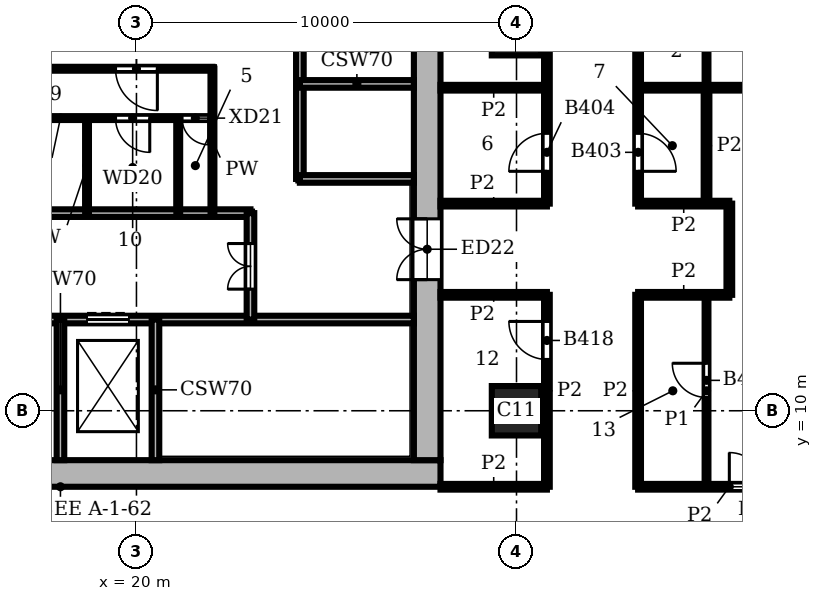
"""IFC4 building model, lengths in metres.
Left out: names, types, materials, properties, quantities, classifications, styles, units other than length and angle.
Written with IfcOpenShell. Run it as: python <this file> out.ifc"""

import sys

from ifc_helpers import new_model, si_unit, direction, frame, frame_2d, origin, origin_2d, place, context, subcontext, project, spatial, rectangle, extrude, element, fill, save


model = new_model("IFC4")
c1 = context("Model", 3, precision=1e-05, world=origin(), true_north=direction((0.0, 1.0)))
c2 = subcontext(c1, "Body", "Model", "MODEL_VIEW")
j1 = project(units=[si_unit("LENGTHUNIT", "METRE"), si_unit("PLANEANGLEUNIT", "RADIAN")], contexts=[c1])
p1 = place(None, origin())
s1 = spatial("IfcSite", under=j1, at=p1, CompositionType="ELEMENT")
p2 = place(p1, origin())
s2 = spatial("IfcBuilding", under=s1, at=p2, CompositionType="ELEMENT")
p3 = place(p2, frame((0.0, 0.0, 166.8)))
s3 = spatial("IfcBuildingStorey", under=s2, at=p3, CompositionType="ELEMENT", Elevation=166.8)
for number, where, z_axis, x_axis in (
    (1, (30.0, 10.0, 0.0), (0.0, 0.0, 1.0), (1.0, 0.0, 0.0)),
    (2, (30.0, 20.0, 0.0), (0.0, 0.0, 1.0), (1.0, 0.0, 0.0)),
):
    element("IfcColumn", number, at=place(p3, frame(where, z_axis=z_axis, x_axis=x_axis)), inside=s3, PredefinedType="COLUMN", context=c2, shape_type="SweptSolid", body=[
        extrude(rectangle(XDim=1.3, YDim=1.3, at=origin_2d()), origin(), (0.0, 0.0, 1.0), 3.9),
    ])
p4 = place(p3, frame((8.0, 8.35, 0.0), z_axis=(0.0, 0.0, 1.0), x_axis=(1.0, 0.0, 0.0)))
e3 = element("IfcWall", 3, at=p4, inside=s3, PredefinedType="SHEAR", context=c2, shape_type="SweptSolid", body=[
    extrude(rectangle(XDim=20.0, YDim=0.7, at=frame_2d((10.0, 0.0))), origin(), (0.0, 0.0, 1.0), 3.9),
])
p5 = place(p3, frame((27.65, 8.7, 0.0), z_axis=(0.0, 0.0, 1.0), x_axis=(0.0, 1.0, 0.0)))
e4 = element("IfcWall", 4, at=p5, inside=s3, PredefinedType="SHEAR", context=c2, shape_type="SweptSolid", body=[
    extrude(rectangle(XDim=18.6, YDim=0.7, at=frame_2d((9.3, 0.0))), origin(), (0.0, 0.0, 1.0), 3.9),
])
p6 = place(p5, frame((4.75, 0.0, 0.0)))
e5 = element("IfcOpeningElement", 5, at=p6, cuts=e4, PredefinedType="OPENING", context=c2, shape_type="SweptSolid", body=[
    extrude(rectangle(XDim=1.6, YDim=2.1, at=frame_2d((0.8, 1.05))), frame((0.0, 0.36, 0.0), z_axis=(0.0, -1.0, 0.0), x_axis=(1.0, 0.0, 0.0)), (0.0, 0.0, 1.0), 0.72),
])
p7 = place(p3, frame((13.8, 12.4, 0.0), z_axis=(0.0, 0.0, 1.0), x_axis=(1.0, 0.0, 0.0)))
e6 = element("IfcWall", 6, at=p7, inside=s3, PredefinedType="SHEAR", context=c2, shape_type="SweptSolid", body=[
    extrude(rectangle(XDim=13.5, YDim=0.2, at=frame_2d((6.75, 0.0))), origin(), (0.0, 0.0, 1.0), 3.58),
])
p8 = place(p7, frame((2.4, 0.0, 0.0)))
e7 = element("IfcOpeningElement", 7, at=p8, cuts=e6, PredefinedType="OPENING", context=c2, shape_type="SweptSolid", body=[
    extrude(rectangle(XDim=1.1, YDim=2.1, at=frame_2d((0.55, 1.05))), frame((0.0, 0.11, 0.0), z_axis=(0.0, -1.0, 0.0), x_axis=(1.0, 0.0, 0.0)), (0.0, 0.0, 1.0), 0.22),
])
p9 = place(p7, frame((4.9, 0.0, 0.0)))
e8 = element("IfcOpeningElement", 8, at=p9, cuts=e6, PredefinedType="OPENING", context=c2, shape_type="SweptSolid", body=[
    extrude(rectangle(XDim=1.1, YDim=2.1, at=frame_2d((0.55, 1.05))), frame((0.0, 0.11, 0.0), z_axis=(0.0, -1.0, 0.0), x_axis=(1.0, 0.0, 0.0)), (0.0, 0.0, 1.0), 0.22),
])
p10 = place(p7, frame((0.2, 0.0, 0.0)))
e9 = element("IfcOpeningElement", 9, at=p10, cuts=e6, PredefinedType="OPENING", context=c2, shape_type="SweptSolid", body=[
    extrude(rectangle(XDim=1.0, YDim=2.1, at=frame_2d((0.5, 1.05))), frame((0.0, 0.11, 0.0), z_axis=(0.0, -1.0, 0.0), x_axis=(1.0, 0.0, 0.0)), (0.0, 0.0, 1.0), 0.22),
])
p11 = place(p3, frame((13.3, 15.2, 0.0), z_axis=(0.0, 0.0, 1.0), x_axis=(1.0, 0.0, 0.0)))
e10 = element("IfcWall", 10, at=p11, inside=s3, PredefinedType="SHEAR", context=c2, shape_type="SweptSolid", body=[
    extrude(rectangle(XDim=9.7, YDim=0.2, at=frame_2d((4.85, 0.0))), origin(), (0.0, 0.0, 1.0), 3.58),
])
p12 = place(p3, frame((24.3, 16.1, 0.0), z_axis=(0.0, 0.0, 1.0), x_axis=(1.0, 0.0, 0.0)))
e11 = element("IfcWall", 11, at=p12, inside=s3, PredefinedType="SHEAR", context=c2, shape_type="SweptSolid", body=[
    extrude(rectangle(XDim=3.0, YDim=0.2, at=frame_2d((1.5, 0.0))), origin(), (0.0, 0.0, 1.0), 3.58),
])
p13 = place(p3, frame((14.0, 17.7, 0.0), z_axis=(0.0, 0.0, 1.0), x_axis=(1.0, 0.0, 0.0)))
e12 = element("IfcWall", 12, at=p13, inside=s3, PredefinedType="PARTITIONING", context=c2, shape_type="SweptSolid", body=[
    extrude(rectangle(XDim=8.0, YDim=0.1, at=frame_2d((4.0, 0.0))), origin(), (0.0, 0.0, 1.0), 3.58),
])
p14 = place(p13, frame((0.45, 0.0, 0.0)))
e13 = element("IfcOpeningElement", 13, at=p14, cuts=e12, PredefinedType="OPENING", context=c2, shape_type="SweptSolid", body=[
    extrude(rectangle(XDim=0.9, YDim=2.1, at=frame_2d((0.45, 1.05))), frame((0.0, 0.06, 0.0), z_axis=(0.0, -1.0, 0.0), x_axis=(1.0, 0.0, 0.0)), (0.0, 0.0, 1.0), 0.12),
])
p15 = place(p13, frame((2.8, 0.0, 0.0)))
e14 = element("IfcOpeningElement", 14, at=p15, cuts=e12, PredefinedType="OPENING", context=c2, shape_type="SweptSolid", body=[
    extrude(rectangle(XDim=0.9, YDim=2.1, at=frame_2d((0.45, 1.05))), frame((0.0, 0.06, 0.0), z_axis=(0.0, -1.0, 0.0), x_axis=(1.0, 0.0, 0.0)), (0.0, 0.0, 1.0), 0.12),
])
p16 = place(p13, frame((5.45, 0.0, 0.0)))
e15 = element("IfcOpeningElement", 15, at=p16, cuts=e12, PredefinedType="OPENING", context=c2, shape_type="SweptSolid", body=[
    extrude(rectangle(XDim=0.9, YDim=2.1, at=frame_2d((0.45, 1.05))), frame((0.0, 0.06, 0.0), z_axis=(0.0, -1.0, 0.0), x_axis=(1.0, 0.0, 0.0)), (0.0, 0.0, 1.0), 0.12),
])
p17 = place(p13, frame((7.2, 0.0, 0.0)))
e16 = element("IfcOpeningElement", 16, at=p17, cuts=e12, PredefinedType="OPENING", context=c2, shape_type="SweptSolid", body=[
    extrude(rectangle(XDim=0.7, YDim=2.1, at=frame_2d((0.35, 1.05))), frame((0.0, 0.06, 0.0), z_axis=(0.0, -1.0, 0.0), x_axis=(1.0, 0.0, 0.0)), (0.0, 0.0, 1.0), 0.12),
])
p18 = place(p3, frame((24.3, 18.6, 0.0), z_axis=(0.0, 0.0, 1.0), x_axis=(1.0, 0.0, 0.0)))
e17 = element("IfcWall", 17, at=p18, inside=s3, PredefinedType="SHEAR", context=c2, shape_type="SweptSolid", body=[
    extrude(rectangle(XDim=3.0, YDim=0.2, at=frame_2d((1.5, 0.0))), origin(), (0.0, 0.0, 1.0), 3.58),
])
p19 = place(p3, frame((14.0, 19.0, 0.0), z_axis=(0.0, 0.0, 1.0), x_axis=(1.0, 0.0, 0.0)))
e18 = element("IfcWall", 18, at=p19, inside=s3, PredefinedType="PARTITIONING", context=c2, shape_type="SweptSolid", body=[
    extrude(rectangle(XDim=8.0, YDim=0.1, at=frame_2d((4.0, 0.0))), origin(), (0.0, 0.0, 1.0), 3.58),
])
p20 = place(p19, frame((5.45, 0.0, 0.0)))
e19 = element("IfcOpeningElement", 19, at=p20, cuts=e18, PredefinedType="OPENING", context=c2, shape_type="SweptSolid", body=[
    extrude(rectangle(XDim=1.1, YDim=2.1, at=frame_2d((0.55, 1.05))), frame((0.0, 0.06, 0.0), z_axis=(0.0, -1.0, 0.0), x_axis=(1.0, 0.0, 0.0)), (0.0, 0.0, 1.0), 0.12),
])
p21 = place(p3, frame((18.0, 8.7, 0.0), z_axis=(0.0, 0.0, 1.0), x_axis=(0.0, 1.0, 0.0)))
e20 = element("IfcWall", 20, at=p21, inside=s3, PredefinedType="SHEAR", context=c2, shape_type="SweptSolid", body=[
    extrude(rectangle(XDim=3.7, YDim=0.2, at=frame_2d((1.85, 0.0))), origin(), (0.0, 0.0, 1.0), 3.58),
])
p22 = place(p3, frame((18.7, 15.2, 0.0), z_axis=(0.0, 0.0, 1.0), x_axis=(0.0, 1.0, 0.0)))
e21 = element("IfcWall", 21, at=p22, inside=s3, PredefinedType="PARTITIONING", context=c2, shape_type="SweptSolid", body=[
    extrude(rectangle(XDim=2.5, YDim=0.1, at=frame_2d((1.25, 0.0))), origin(), (0.0, 0.0, 1.0), 3.58),
])
p23 = place(p3, frame((20.5, 8.7, 0.0), z_axis=(0.0, 0.0, 1.0), x_axis=(0.0, 1.0, 0.0)))
e22 = element("IfcWall", 22, at=p23, inside=s3, PredefinedType="SHEAR", context=c2, shape_type="SweptSolid", body=[
    extrude(rectangle(XDim=3.7, YDim=0.2, at=frame_2d((1.85, 0.0))), origin(), (0.0, 0.0, 1.0), 3.58),
])
p24 = place(p3, frame((21.1, 15.2, 0.0), z_axis=(0.0, 0.0, 1.0), x_axis=(0.0, 1.0, 0.0)))
e23 = element("IfcWall", 23, at=p24, inside=s3, PredefinedType="PARTITIONING", context=c2, shape_type="SweptSolid", body=[
    extrude(rectangle(XDim=2.5, YDim=0.1, at=frame_2d((1.25, 0.0))), origin(), (0.0, 0.0, 1.0), 3.58),
])
p25 = place(p3, frame((22.0, 15.2, 0.0), z_axis=(0.0, 0.0, 1.0), x_axis=(0.0, 1.0, 0.0)))
e24 = element("IfcWall", 24, at=p25, inside=s3, PredefinedType="PARTITIONING", context=c2, shape_type="SweptSolid", body=[
    extrude(rectangle(XDim=3.8, YDim=0.1, at=frame_2d((1.9, 0.0))), origin(), (0.0, 0.0, 1.0), 3.58),
])
p26 = place(p3, frame((23.0, 12.4, 0.0), z_axis=(0.0, 0.0, 1.0), x_axis=(0.0, 1.0, 0.0)))
e25 = element("IfcWall", 25, at=p26, inside=s3, PredefinedType="SHEAR", context=c2, shape_type="SweptSolid", body=[
    extrude(rectangle(XDim=2.8, YDim=0.2, at=frame_2d((1.4, 0.0))), origin(), (0.0, 0.0, 1.0), 3.58),
])
p27 = place(p26, frame((0.8, 0.0, 0.0)))
e26 = element("IfcOpeningElement", 26, at=p27, cuts=e25, PredefinedType="OPENING", context=c2, shape_type="SweptSolid", body=[
    extrude(rectangle(XDim=1.2, YDim=2.1, at=frame_2d((0.6, 1.05))), frame((0.0, 0.11, 0.0), z_axis=(0.0, -1.0, 0.0), x_axis=(1.0, 0.0, 0.0)), (0.0, 0.0, 1.0), 0.22),
])
p28 = place(p3, frame((24.3, 16.1, 0.0), z_axis=(0.0, 0.0, 1.0), x_axis=(0.0, 1.0, 0.0)))
e27 = element("IfcWall", 27, at=p28, inside=s3, PredefinedType="SHEAR", context=c2, shape_type="SweptSolid", body=[
    extrude(rectangle(XDim=7.5, YDim=0.2, at=frame_2d((3.75, 0.0))), origin(), (0.0, 0.0, 1.0), 3.58),
])
p29 = place(p28, frame((5.7, 0.0, 0.0)))
e28 = element("IfcOpeningElement", 28, at=p29, cuts=e27, PredefinedType="OPENING", context=c2, shape_type="SweptSolid", body=[
    extrude(rectangle(XDim=1.1, YDim=2.1, at=frame_2d((0.55, 1.05))), frame((0.0, 0.11, 0.0), z_axis=(0.0, -1.0, 0.0), x_axis=(1.0, 0.0, 0.0)), (0.0, 0.0, 1.0), 0.22),
])
p30 = place(p3, frame((35.0, 8.0, 0.0), z_axis=(0.0, 0.0, 1.0), x_axis=(0.0, 1.0, 0.0)))
e29 = element("IfcWall", 29, at=p30, inside=s3, PredefinedType="PARTITIONING", context=c2, shape_type="SweptSolid", body=[
    extrude(rectangle(XDim=5.05, YDim=0.1, at=frame_2d((2.525, 0.0))), origin(), (0.0, 0.0, 1.0), 3.58),
])
p31 = place(p30, frame((2.35, 0.0, 0.0)))
e30 = element("IfcOpeningElement", 30, at=p31, cuts=e29, PredefinedType="OPENING", context=c2, shape_type="SweptSolid", body=[
    extrude(rectangle(XDim=0.9, YDim=2.1, at=frame_2d((0.45, 1.05))), frame((0.0, 0.06, 0.0), z_axis=(0.0, -1.0, 0.0), x_axis=(1.0, 0.0, 0.0)), (0.0, 0.0, 1.0), 0.12),
])
p32 = place(p3, frame((35.0, 18.5, 0.0), z_axis=(0.0, 0.0, 1.0), x_axis=(0.0, 1.0, 0.0)))
e31 = element("IfcWall", 31, at=p32, inside=s3, PredefinedType="PARTITIONING", context=c2, shape_type="SweptSolid", body=[
    extrude(rectangle(XDim=7.5, YDim=0.1, at=frame_2d((3.75, 0.0))), origin(), (0.0, 0.0, 1.0), 3.58),
])
p33 = place(p32, frame((3.125, 0.0, 0.0)))
e32 = element("IfcOpeningElement", 32, at=p33, cuts=e31, PredefinedType="OPENING", context=c2, shape_type="SweptSolid", body=[
    extrude(rectangle(XDim=0.95, YDim=2.1, at=frame_2d((0.475, 1.05))), frame((0.0, 0.06, 0.0), z_axis=(0.0, -1.0, 0.0), x_axis=(1.0, 0.0, 0.0)), (0.0, 0.0, 1.0), 0.12),
])
p34 = place(p3, frame((30.8, 8.0, 0.0), z_axis=(0.0, 0.0, 1.0), x_axis=(0.0, 1.0, 0.0)))
e33 = element("IfcWall", 33, at=p34, inside=s3, PredefinedType="PARTITIONING", context=c2, shape_type="SweptSolid", body=[
    extrude(rectangle(XDim=5.05, YDim=0.15, at=frame_2d((2.525, 0.0))), origin(), (0.0, 0.0, 1.0), 3.58),
])
p35 = place(p34, frame((3.35, 0.0, 0.0)))
e34 = element("IfcOpeningElement", 34, at=p35, cuts=e33, PredefinedType="OPENING", context=c2, shape_type="SweptSolid", body=[
    extrude(rectangle(XDim=1.0, YDim=2.1, at=frame_2d((0.5, 1.05))), frame((0.0, 0.085, 0.0), z_axis=(0.0, -1.0, 0.0), x_axis=(1.0, 0.0, 0.0)), (0.0, 0.0, 1.0), 0.17),
])
p36 = place(p3, frame((30.8, 15.45, 0.0), z_axis=(0.0, 0.0, 1.0), x_axis=(0.0, 1.0, 0.0)))
e35 = element("IfcWall", 35, at=p36, inside=s3, PredefinedType="PARTITIONING", context=c2, shape_type="SweptSolid", body=[
    extrude(rectangle(XDim=10.55, YDim=0.15, at=frame_2d((5.275, 0.0))), origin(), (0.0, 0.0, 1.0), 3.58),
])
p37 = place(p36, frame((0.85, 0.0, 0.0)))
e36 = element("IfcOpeningElement", 36, at=p37, cuts=e35, PredefinedType="OPENING", context=c2, shape_type="SweptSolid", body=[
    extrude(rectangle(XDim=1.0, YDim=2.1, at=frame_2d((0.5, 1.05))), frame((0.0, 0.085, 0.0), z_axis=(0.0, -1.0, 0.0), x_axis=(1.0, 0.0, 0.0)), (0.0, 0.0, 1.0), 0.17),
])
p38 = place(p36, frame((6.9, 0.0, 0.0)))
e37 = element("IfcOpeningElement", 37, at=p38, cuts=e35, PredefinedType="OPENING", context=c2, shape_type="SweptSolid", body=[
    extrude(rectangle(XDim=1.0, YDim=2.1, at=frame_2d((0.5, 1.05))), frame((0.0, 0.085, 0.0), z_axis=(0.0, -1.0, 0.0), x_axis=(1.0, 0.0, 0.0)), (0.0, 0.0, 1.0), 0.17),
])
p39 = place(p3, frame((33.2, 8.0, 0.0), z_axis=(0.0, 0.0, 1.0), x_axis=(0.0, 1.0, 0.0)))
e38 = element("IfcWall", 38, at=p39, inside=s3, PredefinedType="PARTITIONING", context=c2, shape_type="SweptSolid", body=[
    extrude(rectangle(XDim=5.05, YDim=0.15, at=frame_2d((2.525, 0.0))), origin(), (0.0, 0.0, 1.0), 3.58),
])
p40 = place(p3, frame((33.2, 15.45, 0.0), z_axis=(0.0, 0.0, 1.0), x_axis=(0.0, 1.0, 0.0)))
e39 = element("IfcWall", 39, at=p40, inside=s3, PredefinedType="PARTITIONING", context=c2, shape_type="SweptSolid", body=[
    extrude(rectangle(XDim=10.55, YDim=0.15, at=frame_2d((5.275, 0.0))), origin(), (0.0, 0.0, 1.0), 3.58),
])
p41 = place(p40, frame((0.85, 0.0, 0.0)))
e40 = element("IfcOpeningElement", 40, at=p41, cuts=e39, PredefinedType="OPENING", context=c2, shape_type="SweptSolid", body=[
    extrude(rectangle(XDim=1.0, YDim=2.1, at=frame_2d((0.5, 1.05))), frame((0.0, 0.085, 0.0), z_axis=(0.0, -1.0, 0.0), x_axis=(1.0, 0.0, 0.0)), (0.0, 0.0, 1.0), 0.17),
])
p42 = place(p3, frame((35.0, 15.45, 0.0), z_axis=(0.0, 0.0, 1.0), x_axis=(0.0, 1.0, 0.0)))
e41 = element("IfcWall", 41, at=p42, inside=s3, PredefinedType="PARTITIONING", context=c2, shape_type="SweptSolid", body=[
    extrude(rectangle(XDim=3.05, YDim=0.15, at=frame_2d((1.525, 0.0))), origin(), (0.0, 0.0, 1.0), 3.58),
])
p43 = place(p3, frame((35.6, 13.05, 0.0), z_axis=(0.0, 0.0, 1.0), x_axis=(0.0, 1.0, 0.0)))
e42 = element("IfcWall", 42, at=p43, inside=s3, PredefinedType="PARTITIONING", context=c2, shape_type="SweptSolid", body=[
    extrude(rectangle(XDim=2.4, YDim=0.15, at=frame_2d((1.2, 0.0))), origin(), (0.0, 0.0, 1.0), 3.58),
])
p44 = place(p3, frame((28.0, 8.0, 0.0), z_axis=(0.0, 0.0, 1.0), x_axis=(1.0, 0.0, 0.0)))
e43 = element("IfcWall", 43, at=p44, inside=s3, PredefinedType="PARTITIONING", context=c2, shape_type="SweptSolid", body=[
    extrude(rectangle(XDim=2.8, YDim=0.15, at=frame_2d((1.4, 0.0))), origin(), (0.0, 0.0, 1.0), 3.58),
])
p45 = place(p3, frame((33.2, 8.0, 0.0), z_axis=(0.0, 0.0, 1.0), x_axis=(1.0, 0.0, 0.0)))
e44 = element("IfcWall", 44, at=p45, inside=s3, PredefinedType="PARTITIONING", context=c2, shape_type="SweptSolid", body=[
    extrude(rectangle(XDim=4.8, YDim=0.15, at=frame_2d((2.4, 0.0))), origin(), (0.0, 0.0, 1.0), 3.58),
])
p46 = place(p45, frame((2.4, 0.0, 0.0)))
e45 = element("IfcOpeningElement", 45, at=p46, cuts=e44, PredefinedType="OPENING", context=c2, shape_type="SweptSolid", body=[
    extrude(rectangle(XDim=1.8, YDim=2.1, at=frame_2d((0.9, 1.05))), frame((0.0, 0.085, 0.0), z_axis=(0.0, -1.0, 0.0), x_axis=(1.0, 0.0, 0.0)), (0.0, 0.0, 1.0), 0.17),
])
p47 = place(p3, frame((28.0, 13.05, 0.0), z_axis=(0.0, 0.0, 1.0), x_axis=(1.0, 0.0, 0.0)))
e46 = element("IfcWall", 46, at=p47, inside=s3, PredefinedType="PARTITIONING", context=c2, shape_type="SweptSolid", body=[
    extrude(rectangle(XDim=2.8, YDim=0.15, at=frame_2d((1.4, 0.0))), origin(), (0.0, 0.0, 1.0), 3.58),
])
p48 = place(p3, frame((33.2, 13.05, 0.0), z_axis=(0.0, 0.0, 1.0), x_axis=(1.0, 0.0, 0.0)))
e47 = element("IfcWall", 47, at=p48, inside=s3, PredefinedType="PARTITIONING", context=c2, shape_type="SweptSolid", body=[
    extrude(rectangle(XDim=2.4, YDim=0.15, at=frame_2d((1.2, 0.0))), origin(), (0.0, 0.0, 1.0), 3.58),
])
p49 = place(p3, frame((28.0, 15.45, 0.0), z_axis=(0.0, 0.0, 1.0), x_axis=(1.0, 0.0, 0.0)))
e48 = element("IfcWall", 48, at=p49, inside=s3, PredefinedType="PARTITIONING", context=c2, shape_type="SweptSolid", body=[
    extrude(rectangle(XDim=2.8, YDim=0.15, at=frame_2d((1.4, 0.0))), origin(), (0.0, 0.0, 1.0), 3.58),
])
p50 = place(p3, frame((33.2, 15.45, 0.0), z_axis=(0.0, 0.0, 1.0), x_axis=(1.0, 0.0, 0.0)))
e49 = element("IfcWall", 49, at=p50, inside=s3, PredefinedType="PARTITIONING", context=c2, shape_type="SweptSolid", body=[
    extrude(rectangle(XDim=2.4, YDim=0.15, at=frame_2d((1.2, 0.0))), origin(), (0.0, 0.0, 1.0), 3.58),
])
p51 = place(p3, frame((28.0, 18.5, 0.0), z_axis=(0.0, 0.0, 1.0), x_axis=(1.0, 0.0, 0.0)))
e50 = element("IfcWall", 50, at=p51, inside=s3, PredefinedType="PARTITIONING", context=c2, shape_type="SweptSolid", body=[
    extrude(rectangle(XDim=2.8, YDim=0.15, at=frame_2d((1.4, 0.0))), origin(), (0.0, 0.0, 1.0), 3.58),
])
p52 = place(p3, frame((33.2, 18.5, 0.0), z_axis=(0.0, 0.0, 1.0), x_axis=(1.0, 0.0, 0.0)))
e51 = element("IfcWall", 51, at=p52, inside=s3, PredefinedType="PARTITIONING", context=c2, shape_type="SweptSolid", body=[
    extrude(rectangle(XDim=21.8, YDim=0.15, at=frame_2d((10.9, 0.0))), origin(), (0.0, 0.0, 1.0), 3.58),
])
p53 = place(p9, origin())
e52 = element("IfcDoor", 52, at=p53, inside=s3, OperationType="DOUBLE_DOOR_SLIDING", PredefinedType="DOOR", context=c2, shape_type="SweptSolid", body=[
    extrude(rectangle(XDim=1.1, YDim=2.1, at=frame_2d((0.55, 1.05))), frame((0.0, 0.025, 0.0), z_axis=(0.0, -1.0, 0.0), x_axis=(1.0, 0.0, 0.0)), (0.0, 0.0, 1.0), 0.05),
])
fill(e8, e52)
p54 = place(p27, origin())
e53 = element("IfcDoor", 53, at=p54, inside=s3, OperationType="DOUBLE_DOOR_SINGLE_SWING", PredefinedType="DOOR", context=c2, shape_type="SweptSolid", body=[
    extrude(rectangle(XDim=1.2, YDim=2.1, at=frame_2d((0.6, 1.05))), frame((0.0, 0.025, 0.0), z_axis=(0.0, -1.0, 0.0), x_axis=(1.0, 0.0, 0.0)), (0.0, 0.0, 1.0), 0.05),
])
fill(e26, e53)
p55 = place(p20, frame((1.1, 0.0, 0.0), z_axis=(0.0, 0.0, 1.0), x_axis=(-1.0, 0.0, 0.0)))
e54 = element("IfcDoor", 54, at=p55, inside=s3, OperationType="SINGLE_SWING_LEFT", PredefinedType="DOOR", context=c2, shape_type="SweptSolid", body=[
    extrude(rectangle(XDim=1.1, YDim=2.1, at=frame_2d((0.55, 1.05))), frame((0.0, 0.025, 0.0), z_axis=(0.0, -1.0, 0.0), x_axis=(1.0, 0.0, 0.0)), (0.0, 0.0, 1.0), 0.05),
])
fill(e19, e54)
p56 = place(p16, frame((0.9, 0.0, 0.0), z_axis=(0.0, 0.0, 1.0), x_axis=(-1.0, 0.0, 0.0)))
e55 = element("IfcDoor", 55, at=p56, inside=s3, OperationType="SINGLE_SWING_LEFT", PredefinedType="DOOR", context=c2, shape_type="SweptSolid", body=[
    extrude(rectangle(XDim=0.9, YDim=2.1, at=frame_2d((0.45, 1.05))), frame((0.0, 0.025, 0.0), z_axis=(0.0, -1.0, 0.0), x_axis=(1.0, 0.0, 0.0)), (0.0, 0.0, 1.0), 0.05),
])
fill(e15, e55)
p57 = place(p17, frame((0.7, 0.0, 0.0), z_axis=(0.0, 0.0, 1.0), x_axis=(-1.0, 0.0, 0.0)))
e56 = element("IfcDoor", 56, at=p57, inside=s3, OperationType="SINGLE_SWING_LEFT", PredefinedType="DOOR", context=c2, shape_type="SweptSolid", body=[
    extrude(rectangle(XDim=0.7, YDim=2.1, at=frame_2d((0.35, 1.05))), frame((0.0, 0.025, 0.0), z_axis=(0.0, -1.0, 0.0), x_axis=(1.0, 0.0, 0.0)), (0.0, 0.0, 1.0), 0.05),
])
fill(e16, e56)
p58 = place(p6, origin())
e57 = element("IfcDoor", 57, at=p58, inside=s3, OperationType="DOUBLE_DOOR_SINGLE_SWING", PredefinedType="DOOR", context=c2, shape_type="SweptSolid", body=[
    extrude(rectangle(XDim=1.6, YDim=2.1, at=frame_2d((0.8, 1.05))), frame((0.0, 0.025, 0.0), z_axis=(0.0, -1.0, 0.0), x_axis=(1.0, 0.0, 0.0)), (0.0, 0.0, 1.0), 0.05),
])
fill(e5, e57)
p59 = place(p41, frame((1.0, 0.0, 0.0), z_axis=(0.0, 0.0, 1.0), x_axis=(-1.0, 0.0, 0.0)))
e58 = element("IfcDoor", 58, at=p59, inside=s3, OperationType="SINGLE_SWING_RIGHT", PredefinedType="DOOR", context=c2, shape_type="SweptSolid", body=[
    extrude(rectangle(XDim=1.0, YDim=2.1, at=frame_2d((0.5, 1.05))), frame((0.0, 0.025, 0.0), z_axis=(0.0, -1.0, 0.0), x_axis=(1.0, 0.0, 0.0)), (0.0, 0.0, 1.0), 0.05),
])
fill(e40, e58)
p60 = place(p37, origin())
e59 = element("IfcDoor", 59, at=p60, inside=s3, OperationType="SINGLE_SWING_LEFT", PredefinedType="DOOR", context=c2, shape_type="SweptSolid", body=[
    extrude(rectangle(XDim=1.0, YDim=2.1, at=frame_2d((0.5, 1.05))), frame((0.0, 0.025, 0.0), z_axis=(0.0, -1.0, 0.0), x_axis=(1.0, 0.0, 0.0)), (0.0, 0.0, 1.0), 0.05),
])
fill(e36, e59)
p61 = place(p46, origin())
e60 = element("IfcDoor", 60, at=p61, inside=s3, OperationType="DOUBLE_DOOR_SINGLE_SWING", PredefinedType="DOOR", context=c2, shape_type="SweptSolid", body=[
    extrude(rectangle(XDim=1.8, YDim=2.1, at=frame_2d((0.9, 1.05))), frame((0.0, 0.025, 0.0), z_axis=(0.0, -1.0, 0.0), x_axis=(1.0, 0.0, 0.0)), (0.0, 0.0, 1.0), 0.05),
])
fill(e45, e60)
p62 = place(p35, origin())
e61 = element("IfcDoor", 61, at=p62, inside=s3, OperationType="SINGLE_SWING_RIGHT", PredefinedType="DOOR", context=c2, shape_type="SweptSolid", body=[
    extrude(rectangle(XDim=1.0, YDim=2.1, at=frame_2d((0.5, 1.05))), frame((0.0, 0.025, 0.0), z_axis=(0.0, -1.0, 0.0), x_axis=(1.0, 0.0, 0.0)), (0.0, 0.0, 1.0), 0.05),
])
fill(e34, e61)
p63 = place(p31, origin())
e62 = element("IfcDoor", 62, at=p63, inside=s3, OperationType="SINGLE_SWING_RIGHT", PredefinedType="DOOR", context=c2, shape_type="SweptSolid", body=[
    extrude(rectangle(XDim=0.9, YDim=2.1, at=frame_2d((0.45, 1.05))), frame((0.0, 0.025, 0.0), z_axis=(0.0, -1.0, 0.0), x_axis=(1.0, 0.0, 0.0)), (0.0, 0.0, 1.0), 0.05),
])
fill(e30, e62)
save(model, sys.argv[1])
